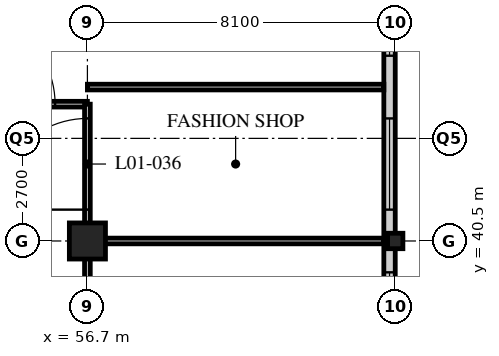
"""IFC4 building model, lengths in metres.
Left out: names, types, materials, properties, quantities, classifications, styles, units other than length and angle.
Written with IfcOpenShell. Run it as: python <this file> out.ifc"""

import sys

from ifc_helpers import new_model, si_unit, direction, frame, frame_2d, origin, origin_2d, place, context, subcontext, project, spatial, rectangle, hollow_rectangle, i_section, extrude, element, fill, save


model = new_model("IFC4")
c1 = context("Model", 3, precision=1e-05, world=origin(), true_north=direction((0.0, 1.0)))
c2 = subcontext(c1, "Body", "Model", "MODEL_VIEW")
j1 = project(units=[si_unit("LENGTHUNIT", "METRE"), si_unit("PLANEANGLEUNIT", "RADIAN")], contexts=[c1])
p1 = place(None, origin())
s1 = spatial("IfcSite", under=j1, at=p1, CompositionType="ELEMENT")
p2 = place(p1, origin())
s2 = spatial("IfcBuilding", under=s1, at=p2, CompositionType="ELEMENT")
p3 = place(p2, frame((0.0, 0.0, 6.0)))
s3 = spatial("IfcBuildingStorey", under=s2, at=p3, CompositionType="ELEMENT", Elevation=6.0)
p4 = place(p3, frame((56.7, 40.5, 0.0), z_axis=(0.0, 0.0, 1.0), x_axis=(1.0, 0.0, 0.0)))
e1 = element("IfcColumn", 1, at=p4, inside=s3, PredefinedType="COLUMN", context=c2, shape_type="SweptSolid", body=[
    extrude(hollow_rectangle(XDim=0.95, YDim=0.95, WallThickness=0.1, at=origin_2d()), origin(), (0.0, 0.0, 1.0), 5.4),
])
p5 = place(p3, frame((64.8, 40.5, 0.0), z_axis=(0.0, 0.0, 1.0), x_axis=(1.0, 0.0, 0.0)))
e2 = element("IfcColumn", 2, at=p5, inside=s3, PredefinedType="COLUMN", context=c2, shape_type="SweptSolid", body=[
    extrude(i_section(OverallWidth=0.403, OverallDepth=0.406, WebThickness=0.027, FlangeThickness=0.043, FilletRadius=0.015, at=origin_2d()), origin(), (0.0, 0.0, 1.0), 5.4),
])
p6 = place(p3, frame((64.65, -7.85, 0.0), z_axis=(0.0, 0.0, 1.0), x_axis=(0.0, 1.0, 0.0)))
e3 = element("IfcWall", 3, at=p6, inside=s3, PredefinedType="SOLIDWALL", context=c2, shape_type="SweptSolid", body=[
    extrude(rectangle(XDim=56.45, YDim=0.3, at=frame_2d((28.225, 0.0))), origin(), (0.0, 0.0, 1.0), 5.15),
])
p7 = place(p6, frame((0.575, 0.0, 1.0)))
e4 = element("IfcOpeningElement", 4, at=p7, cuts=e3, PredefinedType="OPENING", context=c2, shape_type="SweptSolid", body=[
    extrude(rectangle(XDim=2.4, YDim=2.75, at=frame_2d((1.2, 1.375))), frame((0.0, 0.16, 0.0), z_axis=(0.0, -1.0, 0.0), x_axis=(1.0, 0.0, 0.0)), (0.0, 0.0, 1.0), 0.32),
])
p8 = place(p6, frame((4.625, 0.0, 1.0)))
e5 = element("IfcOpeningElement", 5, at=p8, cuts=e3, PredefinedType="OPENING", context=c2, shape_type="SweptSolid", body=[
    extrude(rectangle(XDim=2.4, YDim=2.75, at=frame_2d((1.2, 1.375))), frame((0.0, 0.16, 0.0), z_axis=(0.0, -1.0, 0.0), x_axis=(1.0, 0.0, 0.0)), (0.0, 0.0, 1.0), 0.32),
])
p9 = place(p6, frame((8.675, 0.0, 1.0)))
e6 = element("IfcOpeningElement", 6, at=p9, cuts=e3, PredefinedType="OPENING", context=c2, shape_type="SweptSolid", body=[
    extrude(rectangle(XDim=2.4, YDim=2.75, at=frame_2d((1.2, 1.375))), frame((0.0, 0.16, 0.0), z_axis=(0.0, -1.0, 0.0), x_axis=(1.0, 0.0, 0.0)), (0.0, 0.0, 1.0), 0.32),
])
p10 = place(p6, frame((12.725, 0.0, 1.0)))
e7 = element("IfcOpeningElement", 7, at=p10, cuts=e3, PredefinedType="OPENING", context=c2, shape_type="SweptSolid", body=[
    extrude(rectangle(XDim=2.4, YDim=2.75, at=frame_2d((1.2, 1.375))), frame((0.0, 0.16, 0.0), z_axis=(0.0, -1.0, 0.0), x_axis=(1.0, 0.0, 0.0)), (0.0, 0.0, 1.0), 0.32),
])
p11 = place(p6, frame((16.775, 0.0, 1.0)))
e8 = element("IfcOpeningElement", 8, at=p11, cuts=e3, PredefinedType="OPENING", context=c2, shape_type="SweptSolid", body=[
    extrude(rectangle(XDim=2.4, YDim=2.75, at=frame_2d((1.2, 1.375))), frame((0.0, 0.16, 0.0), z_axis=(0.0, -1.0, 0.0), x_axis=(1.0, 0.0, 0.0)), (0.0, 0.0, 1.0), 0.32),
])
p12 = place(p6, frame((20.825, 0.0, 1.0)))
e9 = element("IfcOpeningElement", 9, at=p12, cuts=e3, PredefinedType="OPENING", context=c2, shape_type="SweptSolid", body=[
    extrude(rectangle(XDim=2.4, YDim=2.75, at=frame_2d((1.2, 1.375))), frame((0.0, 0.16, 0.0), z_axis=(0.0, -1.0, 0.0), x_axis=(1.0, 0.0, 0.0)), (0.0, 0.0, 1.0), 0.32),
])
p13 = place(p6, frame((24.875, 0.0, 1.0)))
e10 = element("IfcOpeningElement", 10, at=p13, cuts=e3, PredefinedType="OPENING", context=c2, shape_type="SweptSolid", body=[
    extrude(rectangle(XDim=2.4, YDim=2.75, at=frame_2d((1.2, 1.375))), frame((0.0, 0.16, 0.0), z_axis=(0.0, -1.0, 0.0), x_axis=(1.0, 0.0, 0.0)), (0.0, 0.0, 1.0), 0.32),
])
p14 = place(p6, frame((28.925, 0.0, 1.0)))
e11 = element("IfcOpeningElement", 11, at=p14, cuts=e3, PredefinedType="OPENING", context=c2, shape_type="SweptSolid", body=[
    extrude(rectangle(XDim=2.4, YDim=2.75, at=frame_2d((1.2, 1.375))), frame((0.0, 0.16, 0.0), z_axis=(0.0, -1.0, 0.0), x_axis=(1.0, 0.0, 0.0)), (0.0, 0.0, 1.0), 0.32),
])
p15 = place(p6, frame((32.975, 0.0, 1.0)))
e12 = element("IfcOpeningElement", 12, at=p15, cuts=e3, PredefinedType="OPENING", context=c2, shape_type="SweptSolid", body=[
    extrude(rectangle(XDim=2.4, YDim=2.75, at=frame_2d((1.2, 1.375))), frame((0.0, 0.16, 0.0), z_axis=(0.0, -1.0, 0.0), x_axis=(1.0, 0.0, 0.0)), (0.0, 0.0, 1.0), 0.32),
])
p16 = place(p6, frame((37.025, 0.0, 1.0)))
e13 = element("IfcOpeningElement", 13, at=p16, cuts=e3, PredefinedType="OPENING", context=c2, shape_type="SweptSolid", body=[
    extrude(rectangle(XDim=2.4, YDim=2.75, at=frame_2d((1.2, 1.375))), frame((0.0, 0.16, 0.0), z_axis=(0.0, -1.0, 0.0), x_axis=(1.0, 0.0, 0.0)), (0.0, 0.0, 1.0), 0.32),
])
p17 = place(p6, frame((41.075, 0.0, 1.0)))
e14 = element("IfcOpeningElement", 14, at=p17, cuts=e3, PredefinedType="OPENING", context=c2, shape_type="SweptSolid", body=[
    extrude(rectangle(XDim=2.4, YDim=2.75, at=frame_2d((1.2, 1.375))), frame((0.0, 0.16, 0.0), z_axis=(0.0, -1.0, 0.0), x_axis=(1.0, 0.0, 0.0)), (0.0, 0.0, 1.0), 0.32),
])
p18 = place(p6, frame((45.125, 0.0, 1.0)))
e15 = element("IfcOpeningElement", 15, at=p18, cuts=e3, PredefinedType="OPENING", context=c2, shape_type="SweptSolid", body=[
    extrude(rectangle(XDim=2.4, YDim=2.75, at=frame_2d((1.2, 1.375))), frame((0.0, 0.16, 0.0), z_axis=(0.0, -1.0, 0.0), x_axis=(1.0, 0.0, 0.0)), (0.0, 0.0, 1.0), 0.32),
])
p19 = place(p6, frame((49.175, 0.0, 1.0)))
e16 = element("IfcOpeningElement", 16, at=p19, cuts=e3, PredefinedType="OPENING", context=c2, shape_type="SweptSolid", body=[
    extrude(rectangle(XDim=2.4, YDim=2.75, at=frame_2d((1.2, 1.375))), frame((0.0, 0.16, 0.0), z_axis=(0.0, -1.0, 0.0), x_axis=(1.0, 0.0, 0.0)), (0.0, 0.0, 1.0), 0.32),
])
p20 = place(p6, frame((53.225, 0.0, 1.0)))
e17 = element("IfcOpeningElement", 17, at=p20, cuts=e3, PredefinedType="OPENING", context=c2, shape_type="SweptSolid", body=[
    extrude(rectangle(XDim=2.4, YDim=2.75, at=frame_2d((1.2, 1.375))), frame((0.0, 0.16, 0.0), z_axis=(0.0, -1.0, 0.0), x_axis=(1.0, 0.0, 0.0)), (0.0, 0.0, 1.0), 0.32),
])
p21 = place(p3, frame((0.0, 44.1, 0.0), z_axis=(0.0, 0.0, 1.0), x_axis=(1.0, 0.0, 0.0)))
e18 = element("IfcWall", 18, at=p21, inside=s3, PredefinedType="PARTITIONING", context=c2, shape_type="SweptSolid", body=[
    extrude(rectangle(XDim=56.7, YDim=0.15, at=frame_2d((28.35, 0.0))), origin(), (0.0, 0.0, 1.0), 5.15),
])
p22 = place(p21, frame((10.95, 0.0, 0.0)))
e19 = element("IfcOpeningElement", 19, at=p22, cuts=e18, PredefinedType="OPENING", context=c2, shape_type="SweptSolid", body=[
    extrude(rectangle(XDim=2.4, YDim=2.7, at=frame_2d((1.2, 1.35))), frame((0.0, 0.085, 0.0), z_axis=(0.0, -1.0, 0.0), x_axis=(1.0, 0.0, 0.0)), (0.0, 0.0, 1.0), 0.17),
])
p23 = place(p21, frame((19.05, 0.0, 0.0)))
e20 = element("IfcOpeningElement", 20, at=p23, cuts=e18, PredefinedType="OPENING", context=c2, shape_type="SweptSolid", body=[
    extrude(rectangle(XDim=2.4, YDim=2.7, at=frame_2d((1.2, 1.35))), frame((0.0, 0.085, 0.0), z_axis=(0.0, -1.0, 0.0), x_axis=(1.0, 0.0, 0.0)), (0.0, 0.0, 1.0), 0.17),
])
p24 = place(p21, frame((27.15, 0.0, 0.0)))
e21 = element("IfcOpeningElement", 21, at=p24, cuts=e18, PredefinedType="OPENING", context=c2, shape_type="SweptSolid", body=[
    extrude(rectangle(XDim=2.4, YDim=2.7, at=frame_2d((1.2, 1.35))), frame((0.0, 0.085, 0.0), z_axis=(0.0, -1.0, 0.0), x_axis=(1.0, 0.0, 0.0)), (0.0, 0.0, 1.0), 0.17),
])
p25 = place(p21, frame((35.25, 0.0, 0.0)))
e22 = element("IfcOpeningElement", 22, at=p25, cuts=e18, PredefinedType="OPENING", context=c2, shape_type="SweptSolid", body=[
    extrude(rectangle(XDim=2.4, YDim=2.7, at=frame_2d((1.2, 1.35))), frame((0.0, 0.085, 0.0), z_axis=(0.0, -1.0, 0.0), x_axis=(1.0, 0.0, 0.0)), (0.0, 0.0, 1.0), 0.17),
])
p26 = place(p21, frame((43.35, 0.0, 0.0)))
e23 = element("IfcOpeningElement", 23, at=p26, cuts=e18, PredefinedType="OPENING", context=c2, shape_type="SweptSolid", body=[
    extrude(rectangle(XDim=2.4, YDim=2.7, at=frame_2d((1.2, 1.35))), frame((0.0, 0.085, 0.0), z_axis=(0.0, -1.0, 0.0), x_axis=(1.0, 0.0, 0.0)), (0.0, 0.0, 1.0), 0.17),
])
p27 = place(p21, frame((53.45, 0.0, 0.0)))
e24 = element("IfcOpeningElement", 24, at=p27, cuts=e18, PredefinedType="OPENING", context=c2, shape_type="SweptSolid", body=[
    extrude(rectangle(XDim=2.4, YDim=2.7, at=frame_2d((1.2, 1.35))), frame((0.0, 0.085, 0.0), z_axis=(0.0, -1.0, 0.0), x_axis=(1.0, 0.0, 0.0)), (0.0, 0.0, 1.0), 0.17),
])
p28 = place(p21, frame((4.85, 0.0, 0.0)))
e25 = element("IfcOpeningElement", 25, at=p28, cuts=e18, PredefinedType="OPENING", context=c2, shape_type="SweptSolid", body=[
    extrude(rectangle(XDim=2.4, YDim=2.7, at=frame_2d((1.2, 1.35))), frame((0.0, 0.085, 0.0), z_axis=(0.0, -1.0, 0.0), x_axis=(1.0, 0.0, 0.0)), (0.0, 0.0, 1.0), 0.17),
])
p29 = place(p3, frame((56.7, 0.0, 0.0), z_axis=(0.0, 0.0, 1.0), x_axis=(0.0, 1.0, 0.0)))
e26 = element("IfcWall", 26, at=p29, inside=s3, PredefinedType="PARTITIONING", context=c2, shape_type="SweptSolid", body=[
    extrude(rectangle(XDim=44.1, YDim=0.15, at=frame_2d((22.05, 0.0))), origin(), (0.0, 0.0, 1.0), 4.538),
])
p30 = place(p29, frame((2.85, 0.0, 0.0)))
e27 = element("IfcOpeningElement", 27, at=p30, cuts=e26, PredefinedType="OPENING", context=c2, shape_type="SweptSolid", body=[
    extrude(rectangle(XDim=2.4, YDim=2.7, at=frame_2d((1.2, 1.35))), frame((0.0, 0.085, 0.0), z_axis=(0.0, -1.0, 0.0), x_axis=(1.0, 0.0, 0.0)), (0.0, 0.0, 1.0), 0.17),
])
p31 = place(p29, frame((10.95, 0.0, 0.0)))
e28 = element("IfcOpeningElement", 28, at=p31, cuts=e26, PredefinedType="OPENING", context=c2, shape_type="SweptSolid", body=[
    extrude(rectangle(XDim=2.4, YDim=2.7, at=frame_2d((1.2, 1.35))), frame((0.0, 0.085, 0.0), z_axis=(0.0, -1.0, 0.0), x_axis=(1.0, 0.0, 0.0)), (0.0, 0.0, 1.0), 0.17),
])
p32 = place(p29, frame((19.05, 0.0, 0.0)))
e29 = element("IfcOpeningElement", 29, at=p32, cuts=e26, PredefinedType="OPENING", context=c2, shape_type="SweptSolid", body=[
    extrude(rectangle(XDim=2.4, YDim=2.7, at=frame_2d((1.2, 1.35))), frame((0.0, 0.085, 0.0), z_axis=(0.0, -1.0, 0.0), x_axis=(1.0, 0.0, 0.0)), (0.0, 0.0, 1.0), 0.17),
])
p33 = place(p29, frame((27.15, 0.0, 0.0)))
e30 = element("IfcOpeningElement", 30, at=p33, cuts=e26, PredefinedType="OPENING", context=c2, shape_type="SweptSolid", body=[
    extrude(rectangle(XDim=2.4, YDim=2.7, at=frame_2d((1.2, 1.35))), frame((0.0, 0.085, 0.0), z_axis=(0.0, -1.0, 0.0), x_axis=(1.0, 0.0, 0.0)), (0.0, 0.0, 1.0), 0.17),
])
p34 = place(p29, frame((35.25, 0.0, 0.0)))
e31 = element("IfcOpeningElement", 31, at=p34, cuts=e26, PredefinedType="OPENING", context=c2, shape_type="SweptSolid", body=[
    extrude(rectangle(XDim=2.4, YDim=2.7, at=frame_2d((1.2, 1.35))), frame((0.0, 0.085, 0.0), z_axis=(0.0, -1.0, 0.0), x_axis=(1.0, 0.0, 0.0)), (0.0, 0.0, 1.0), 0.17),
])
p35 = place(p29, frame((41.325, 0.0, 0.0)))
e32 = element("IfcOpeningElement", 32, at=p35, cuts=e26, PredefinedType="OPENING", context=c2, shape_type="SweptSolid", body=[
    extrude(rectangle(XDim=2.4, YDim=2.7, at=frame_2d((1.2, 1.35))), frame((0.0, 0.085, 0.0), z_axis=(0.0, -1.0, 0.0), x_axis=(1.0, 0.0, 0.0)), (0.0, 0.0, 1.0), 0.17),
])
p36 = place(p3, frame((56.7, 40.5, 0.0), z_axis=(0.0, 0.0, 1.0), x_axis=(1.0, 0.0, 0.0)))
e33 = element("IfcWall", 33, at=p36, inside=s3, PredefinedType="PARTITIONING", context=c2, shape_type="SweptSolid", body=[
    extrude(rectangle(XDim=7.8, YDim=0.15, at=frame_2d((3.9, 0.0))), origin(), (0.0, 0.0, 1.0), 4.538),
])
p37 = place(p3, frame((56.7, 44.55, 0.0), z_axis=(0.0, 0.0, 1.0), x_axis=(1.0, 0.0, 0.0)))
e34 = element("IfcWall", 34, at=p37, inside=s3, PredefinedType="PARTITIONING", context=c2, shape_type="SweptSolid", body=[
    extrude(rectangle(XDim=7.8, YDim=0.15, at=frame_2d((3.9, 0.0))), origin(), (0.0, 0.0, 1.0), 5.15),
])
p38 = place(p18, origin())
e35 = element("IfcWindow", 35, at=p38, inside=s3, PartitioningType="SINGLE_PANEL", PredefinedType="WINDOW", context=c2, shape_type="SweptSolid", body=[
    extrude(rectangle(XDim=2.4, YDim=2.75, at=frame_2d((1.2, 1.375))), frame((0.0, 0.03, 0.0), z_axis=(0.0, -1.0, 0.0), x_axis=(1.0, 0.0, 0.0)), (0.0, 0.0, 1.0), 0.06),
])
fill(e15, e35)
p39 = place(p19, origin())
e36 = element("IfcWindow", 36, at=p39, inside=s3, PartitioningType="SINGLE_PANEL", PredefinedType="WINDOW", context=c2, shape_type="SweptSolid", body=[
    extrude(rectangle(XDim=2.4, YDim=2.75, at=frame_2d((1.2, 1.375))), frame((0.0, 0.03, 0.0), z_axis=(0.0, -1.0, 0.0), x_axis=(1.0, 0.0, 0.0)), (0.0, 0.0, 1.0), 0.06),
])
fill(e16, e36)
p40 = place(p20, origin())
e37 = element("IfcWindow", 37, at=p40, inside=s3, PartitioningType="SINGLE_PANEL", PredefinedType="WINDOW", context=c2, shape_type="SweptSolid", body=[
    extrude(rectangle(XDim=2.4, YDim=2.75, at=frame_2d((1.2, 1.375))), frame((0.0, 0.03, 0.0), z_axis=(0.0, -1.0, 0.0), x_axis=(1.0, 0.0, 0.0)), (0.0, 0.0, 1.0), 0.06),
])
fill(e17, e37)
p41 = place(p35, origin())
e38 = element("IfcDoor", 38, at=p41, inside=s3, OperationType="DOUBLE_DOOR_SINGLE_SWING", PredefinedType="DOOR", context=c2, shape_type="SweptSolid", body=[
    extrude(rectangle(XDim=2.4, YDim=2.7, at=frame_2d((1.2, 1.35))), frame((0.0, 0.025, 0.0), z_axis=(0.0, -1.0, 0.0), x_axis=(1.0, 0.0, 0.0)), (0.0, 0.0, 1.0), 0.05),
])
fill(e32, e38)
p42 = place(p27, origin())
e39 = element("IfcDoor", 39, at=p42, inside=s3, OperationType="DOUBLE_DOOR_SINGLE_SWING", PredefinedType="DOOR", context=c2, shape_type="SweptSolid", body=[
    extrude(rectangle(XDim=2.4, YDim=2.7, at=frame_2d((1.2, 1.35))), frame((0.0, 0.025, 0.0), z_axis=(0.0, -1.0, 0.0), x_axis=(1.0, 0.0, 0.0)), (0.0, 0.0, 1.0), 0.05),
])
fill(e24, e39)
save(model, sys.argv[1])
